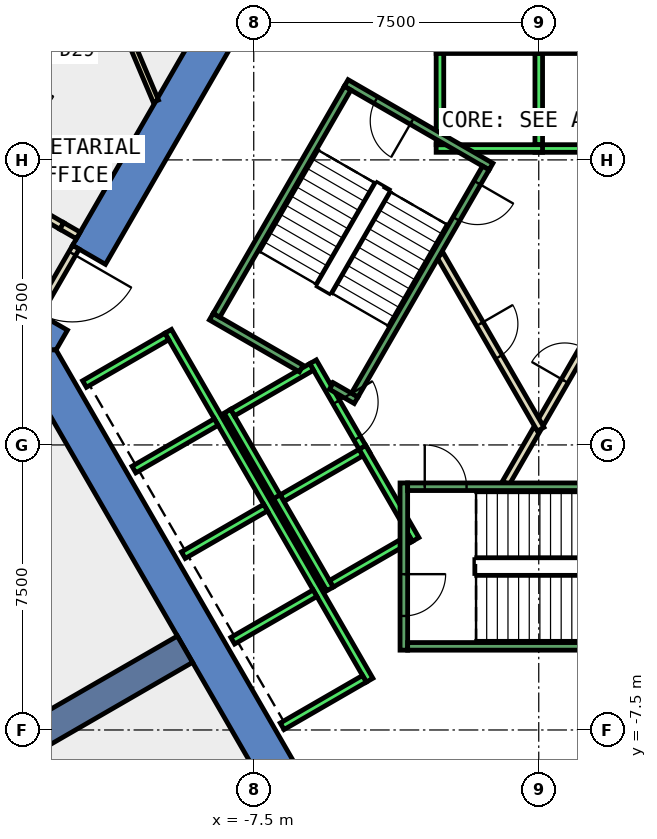
"""IFC4 building model, lengths in metres.
Left out: names, types, materials, properties, quantities, classifications, styles, units other than length and angle.
Written with IfcOpenShell. Run it as: python <this file> out.ifc"""

import sys

from ifc_helpers import new_model, si_unit, direction, frame, frame_2d, origin, place, context, subcontext, project, spatial, polyline, rectangle, outline, extrude, element, fill, save


model = new_model("IFC4")
c1 = context("Model", 3, precision=1e-05, world=origin(), true_north=direction((0.0, 1.0)))
c2 = subcontext(c1, "Body", "Model", "MODEL_VIEW")
j1 = project(units=[si_unit("LENGTHUNIT", "METRE"), si_unit("PLANEANGLEUNIT", "RADIAN")], contexts=[c1])
p1 = place(None, origin())
s1 = spatial("IfcSite", under=j1, at=p1, CompositionType="ELEMENT")
p2 = place(p1, origin())
s2 = spatial("IfcBuilding", under=s1, at=p2, CompositionType="ELEMENT")
p3 = place(p2, frame((0.0, 0.0, 180.2)))
s3 = spatial("IfcBuildingStorey", under=s2, at=p3, CompositionType="ELEMENT", Elevation=180.2)
p4 = place(p3, frame((0.0, 0.0, -0.4)))
e1 = element("IfcWall", 1, at=p4, inside=s3, PredefinedType="SHEAR", context=c2, shape_type="SweptSolid", body=[
    extrude(outline(polyline([(-12.267, 5.252), (-11.402, 4.752), (-6.351, 13.5), (-6.928, 14.5), (-12.267, 5.252)])), origin(), (0.0, 0.0, 1.0), 4.0),
])
p5 = place(p3, frame((0.0, 0.0, -0.4)))
e2 = element("IfcWall", 2, at=p5, inside=s3, PredefinedType="SHEAR", context=c2, shape_type="SweptSolid", body=[
    extrude(outline(polyline([(-12.402, 3.02), (-13.267, 3.52), (-13.856, 2.5), (-12.702, 2.5), (-12.402, 3.02)])), origin(), (0.0, 0.0, 1.0), 4.0),
])
p6 = place(p3, frame((0.0, 0.0, -0.4)))
e3 = element("IfcWall", 3, at=p6, inside=s3, PredefinedType="SHEAR", context=c2, shape_type="SweptSolid", body=[
    extrude(outline(polyline([(-13.856, 2.5), (-6.928, -9.5), (-6.351, -8.5), (-12.702, 2.5), (-13.856, 2.5)])), origin(), (0.0, 0.0, 1.0), 4.0),
])
p7 = place(p3, frame((-9.31, -5.375, -0.4), z_axis=(0.0, 0.0, 1.0), x_axis=(-0.866017533419, -0.500013631625, 0.0)))
e4 = element("IfcWall", 4, at=p7, inside=s3, PredefinedType="SHEAR", context=c2, shape_type="SweptSolid", body=[
    extrude(rectangle(XDim=9.0, YDim=0.8, at=frame_2d((4.5, 0.0))), origin(), (0.0, 0.0, 1.0), 4.0),
])
p8 = place(p3, frame((-12.67, 11.334, 0.0), z_axis=(0.0, 0.0, 1.0), x_axis=(-0.500035159864, -0.866005103276, 0.0)))
e5 = element("IfcWall", 5, at=p8, inside=s3, PredefinedType="PARTITIONING", context=c2, shape_type="SweptSolid", body=[
    extrude(rectangle(XDim=4.866, YDim=0.2, at=frame_2d((2.433, 0.0))), origin(), (0.0, 0.0, 1.0), 3.6),
])
p9 = place(p8, frame((1.933, 0.0, 0.0)))
e6 = element("IfcOpeningElement", 6, at=p9, cuts=e5, PredefinedType="OPENING", context=c2, shape_type="SweptSolid", body=[
    extrude(rectangle(XDim=1.0, YDim=2.1, at=frame_2d((0.5, 1.05))), frame((0.0, 0.11, 0.0), z_axis=(0.0, -1.0, 0.0), x_axis=(1.0, 0.0, 0.0)), (0.0, 0.0, 1.0), 0.22),
])
p10 = place(p3, frame((-14.966, 7.157, 0.0), z_axis=(0.0, 0.0, 1.0), x_axis=(0.86600487494, -0.500035555316, 0.0)))
e7 = element("IfcWall", 7, at=p10, inside=s3, PredefinedType="PARTITIONING", context=c2, shape_type="SweptSolid", body=[
    extrude(rectangle(XDim=2.79, YDim=0.2, at=frame_2d((1.395, 0.0))), origin(), (0.0, 0.0, 1.0), 3.6),
])
p11 = place(p3, frame((-10.076, 9.047, 0.0), z_axis=(0.0, 0.0, 1.0), x_axis=(-0.389223462263, 0.921143363665, 0.0)))
e8 = element("IfcWall", 8, at=p11, inside=s3, PredefinedType="PARTITIONING", context=c2, shape_type="SweptSolid", body=[
    extrude(rectangle(XDim=4.322, YDim=0.15, at=frame_2d((2.161, 0.0))), origin(), (0.0, 0.0, 1.0), 3.6),
])
p12 = place(p3, frame((-0.866, -1.0, 0.0), z_axis=(0.0, 0.0, 1.0), x_axis=(0.500033287521, 0.866006184372, 0.0)))
e9 = element("IfcWall", 9, at=p12, inside=s3, PredefinedType="PARTITIONING", context=c2, shape_type="SweptSolid", body=[
    extrude(rectangle(XDim=1.632, YDim=0.2, at=frame_2d((0.816, 0.0))), origin(), (0.0, 0.0, 1.0), 3.6),
])
p13 = place(p3, frame((0.05, 0.587, 0.0), z_axis=(0.0, 0.0, 1.0), x_axis=(0.500028932171, 0.866008699143, 0.0)))
e10 = element("IfcWall", 10, at=p13, inside=s3, PredefinedType="PARTITIONING", context=c2, shape_type="SweptSolid", body=[
    extrude(rectangle(XDim=3.632, YDim=0.2, at=frame_2d((1.816, 0.0))), origin(), (0.0, 0.0, 1.0), 3.6),
])
p14 = place(p13, frame((1.266, 0.0, 0.0)))
e11 = element("IfcOpeningElement", 11, at=p14, cuts=e10, PredefinedType="OPENING", context=c2, shape_type="SweptSolid", body=[
    extrude(rectangle(XDim=1.0, YDim=2.1, at=frame_2d((0.5, 1.05))), frame((0.0, 0.11, 0.0), z_axis=(0.0, -1.0, 0.0), x_axis=(1.0, 0.0, 0.0)), (0.0, 0.0, 1.0), 0.22),
])
p15 = place(p3, frame((-2.598, 5.0, 0.0), z_axis=(0.0, 0.0, 1.0), x_axis=(0.49995654735, -0.86605048973, 0.0)))
e12 = element("IfcWall", 12, at=p15, inside=s3, PredefinedType="PARTITIONING", context=c2, shape_type="SweptSolid", body=[
    extrude(rectangle(XDim=5.296, YDim=0.2, at=frame_2d((2.648, 0.0))), origin(), (0.0, 0.0, 1.0), 3.6),
])
p16 = place(p15, frame((2.098, 0.0, 0.0)))
e13 = element("IfcOpeningElement", 13, at=p16, cuts=e12, PredefinedType="OPENING", context=c2, shape_type="SweptSolid", body=[
    extrude(rectangle(XDim=1.0, YDim=2.1, at=frame_2d((0.5, 1.05))), frame((0.0, 0.11, 0.0), z_axis=(0.0, -1.0, 0.0), x_axis=(1.0, 0.0, 0.0)), (0.0, 0.0, 1.0), 0.22),
])
p17 = place(p3, frame((-12.18, 5.202, 0.0), z_axis=(0.0, 0.0, 1.0), x_axis=(-0.50002537861, -0.866010750942, 0.0)))
e14 = element("IfcWall", 14, at=p17, inside=s3, PredefinedType="PARTITIONING", context=c2, shape_type="SweptSolid", body=[
    extrude(rectangle(XDim=2.0, YDim=0.2, at=frame_2d((1.0, 0.0))), origin(), (0.0, 0.0, 1.0), 2.4),
])
p18 = place(p17, frame((0.19, 0.0, 0.0)))
e15 = element("IfcOpeningElement", 15, at=p18, cuts=e14, PredefinedType="OPENING", context=c2, shape_type="SweptSolid", body=[
    extrude(rectangle(XDim=1.8, YDim=2.1, at=frame_2d((0.9, 1.05))), frame((0.0, 0.11, 0.0), z_axis=(0.0, -1.0, 0.0), x_axis=(1.0, 0.0, 0.0)), (0.0, 0.0, 1.0), 0.22),
])
p19 = place(p3, frame((-12.55, 5.762, 0.0), z_axis=(0.0, 0.0, 1.0), x_axis=(0.866071776036, -0.499919672301, 0.0)))
e16 = element("IfcWall", 16, at=p19, inside=s3, PredefinedType="PARTITIONING", context=c2, shape_type="SweptSolid", body=[
    extrude(rectangle(XDim=0.5, YDim=0.2, at=frame_2d((0.25, 0.0))), origin(), (0.0, 0.0, 1.0), 2.4),
])
p20 = place(p3, frame((-5.94, 2.188, 0.0), z_axis=(0.0, 0.0, 1.0), x_axis=(0.49994636267, -0.866056369097, 0.0)))
e17 = element("IfcWall", 17, at=p20, inside=s3, PredefinedType="STANDARD", context=c2, shape_type="SweptSolid", body=[
    extrude(rectangle(XDim=2.8, YDim=0.2, at=frame_2d((1.4, 0.0))), origin(), (0.0, 0.0, 1.0), 3.6),
])
p21 = place(p20, frame((1.225, 0.0, 0.0)))
e18 = element("IfcOpeningElement", 18, at=p21, cuts=e17, PredefinedType="OPENING", context=c2, shape_type="SweptSolid", body=[
    extrude(rectangle(XDim=1.1, YDim=2.1, at=frame_2d((0.55, 1.05))), frame((0.0, 0.11, 0.0), z_axis=(0.0, -1.0, 0.0), x_axis=(1.0, 0.0, 0.0)), (0.0, 0.0, 1.0), 0.22),
])
p22 = place(p3, frame((-8.192, 0.888, 0.0), z_axis=(0.0, 0.0, 1.0), x_axis=(0.49994636267, -0.866056369097, 0.0)))
e19 = element("IfcWall", 19, at=p22, inside=s3, PredefinedType="STANDARD", context=c2, shape_type="SweptSolid", body=[
    extrude(rectangle(XDim=2.8, YDim=0.2, at=frame_2d((1.4, 0.0))), origin(), (0.0, 0.0, 1.0), 3.6),
])
for number, where, z_axis, x_axis in (
    (20, (-5.977, 2.052, 0.0), (0.0, 0.0, 1.0), (-0.866, -0.5, 0.0)),
    (21, (-4.677, -0.2, 0.0), (0.0, 0.0, 1.0), (-0.866, -0.5, 0.0)),
):
    element("IfcWall", number, at=place(p3, frame(where, z_axis=z_axis, x_axis=x_axis)), inside=s3, PredefinedType="STANDARD", context=c2, shape_type="SweptSolid", body=[
        extrude(rectangle(XDim=2.399, YDim=0.2, at=frame_2d((1.2, 0.0))), origin(), (0.0, 0.0, 1.0), 3.6),
    ])
p23 = place(p3, frame((-9.751, 2.99, 0.0), z_axis=(0.0, 0.0, 1.0), x_axis=(0.50000090737, -0.866024879913, 0.0)))
e22 = element("IfcWall", 22, at=p23, inside=s3, PredefinedType="STANDARD", context=c2, shape_type="SweptSolid", body=[
    extrude(rectangle(XDim=10.6, YDim=0.2, at=frame_2d((5.3, 0.0))), origin(), (0.0, 0.0, 1.0), 3.6),
])
p24 = place(p3, frame((-9.788, 2.853, 0.0), z_axis=(0.0, 0.0, 1.0), x_axis=(-0.865998541277, -0.500046524342, 0.0)))
e23 = element("IfcWall", 23, at=p24, inside=s3, PredefinedType="STANDARD", context=c2, shape_type="SweptSolid", body=[
    extrude(rectangle(XDim=2.5, YDim=0.2, at=frame_2d((1.25, 0.0))), origin(), (0.0, 0.0, 1.0), 3.6),
])
for number, where, z_axis, x_axis in (
    (24, (-8.488, 0.602, 0.0), (0.0, 0.0, 1.0), (-0.866, -0.5, 0.0)),
    (25, (-7.188, -1.65, 0.0), (0.0, 0.0, 1.0), (-0.866, -0.5, 0.0)),
    (26, (-5.888, -3.902, 0.0), (0.0, 0.0, 1.0), (-0.866, -0.5, 0.0)),
    (27, (-4.588, -6.153, 0.0), (0.0, 0.0, 1.0), (-0.866, -0.5, 0.0)),
):
    element("IfcWall", number, at=place(p3, frame(where, z_axis=z_axis, x_axis=x_axis)), inside=s3, PredefinedType="STANDARD", context=c2, shape_type="SweptSolid", body=[
        extrude(rectangle(XDim=2.5, YDim=0.2, at=frame_2d((1.25, 0.0))), origin(), (0.0, 0.0, 1.0), 3.6),
    ])
for number, where, z_axis, x_axis in (
    (28, (2.7, 7.8, 0.0), (0.0, 0.0, 1.0), (-1.0, 0.0, 0.0)),
    (29, (2.7, 10.4, 0.0), (0.0, 0.0, 1.0), (-1.0, 0.0, 0.0)),
):
    element("IfcWall", number, at=place(p3, frame(where, z_axis=z_axis, x_axis=x_axis)), inside=s3, PredefinedType="STANDARD", context=c2, shape_type="SweptSolid", body=[
        extrude(rectangle(XDim=2.8, YDim=0.2, at=frame_2d((1.4, 0.0))), origin(), (0.0, 0.0, 1.0), 2.3),
    ])
p25 = place(p3, frame((0.0, 7.9, 0.0), z_axis=(0.0, 0.0, 1.0), x_axis=(0.0, 1.0, 0.0)))
e30 = element("IfcWall", 30, at=p25, inside=s3, PredefinedType="STANDARD", context=c2, shape_type="SweptSolid", body=[
    extrude(rectangle(XDim=2.4, YDim=0.2, at=frame_2d((1.2, 0.0))), origin(), (0.0, 0.0, 1.0), 2.3),
])
for number, where, z_axis, x_axis in (
    (31, (0.1, 7.8, 0.0), (0.0, 0.0, 1.0), (-1.0, 0.0, 0.0)),
    (32, (0.1, 10.4, 0.0), (0.0, 0.0, 1.0), (-1.0, 0.0, 0.0)),
):
    element("IfcWall", number, at=place(p3, frame(where, z_axis=z_axis, x_axis=x_axis)), inside=s3, PredefinedType="STANDARD", context=c2, shape_type="SweptSolid", body=[
        extrude(rectangle(XDim=2.8, YDim=0.2, at=frame_2d((1.4, 0.0))), origin(), (0.0, 0.0, 1.0), 2.3),
    ])
p26 = place(p3, frame((-2.6, 7.9, 0.0), z_axis=(0.0, 0.0, 1.0), x_axis=(0.0, 1.0, 0.0)))
e33 = element("IfcWall", 33, at=p26, inside=s3, PredefinedType="STANDARD", context=c2, shape_type="SweptSolid", body=[
    extrude(rectangle(XDim=2.4, YDim=0.2, at=frame_2d((1.2, 0.0))), origin(), (0.0, 0.0, 1.0), 2.3),
])
p27 = place(p3, frame((-4.64, -0.063, 0.0), z_axis=(0.0, 0.0, 1.0), x_axis=(0.49994636267, -0.866056369097, 0.0)))
e34 = element("IfcWall", 34, at=p27, inside=s3, PredefinedType="STANDARD", context=c2, shape_type="SweptSolid", body=[
    extrude(rectangle(XDim=2.8, YDim=0.2, at=frame_2d((1.4, 0.0))), origin(), (0.0, 0.0, 1.0), 2.3),
])
p28 = place(p3, frame((-6.892, -1.363, 0.0), z_axis=(0.0, 0.0, 1.0), x_axis=(0.500011755427, -0.866018616679, 0.0)))
e35 = element("IfcWall", 35, at=p28, inside=s3, PredefinedType="STANDARD", context=c2, shape_type="SweptSolid", body=[
    extrude(rectangle(XDim=2.8, YDim=0.2, at=frame_2d((1.4, 0.0))), origin(), (0.0, 0.0, 1.0), 2.3),
])
p29 = place(p3, frame((-3.377, -2.452, 0.0), z_axis=(0.0, 0.0, 1.0), x_axis=(-0.865955154139, -0.50012165622, 0.0)))
e36 = element("IfcWall", 36, at=p29, inside=s3, PredefinedType="STANDARD", context=c2, shape_type="SweptSolid", body=[
    extrude(rectangle(XDim=2.4, YDim=0.2, at=frame_2d((1.2, 0.0))), origin(), (0.0, 0.0, 1.0), 2.3),
])
p30 = place(p3, frame((-3.55, -1.0, 0.0), z_axis=(0.0, 0.0, 1.0), x_axis=(0.0, -1.0, 0.0)))
e37 = element("IfcWall", 37, at=p30, inside=s3, PredefinedType="STANDARD", context=c2, shape_type="SweptSolid", body=[
    extrude(rectangle(XDim=4.4, YDim=0.2, at=frame_2d((2.2, 0.0))), origin(), (0.0, 0.0, 1.0), 3.6),
])
p31 = place(p30, frame((2.4, 0.0, 0.0)))
e38 = element("IfcOpeningElement", 38, at=p31, cuts=e37, PredefinedType="OPENING", context=c2, shape_type="SweptSolid", body=[
    extrude(rectangle(XDim=1.1, YDim=2.2, at=frame_2d((0.55, 1.1))), frame((0.0, 0.11, 0.0), z_axis=(0.0, -1.0, 0.0), x_axis=(1.0, 0.0, 0.0)), (0.0, 0.0, 1.0), 0.22),
])
p32 = place(p3, frame((-3.45, -1.1, 0.0), z_axis=(0.0, 0.0, 1.0), x_axis=(1.0, 0.0, 0.0)))
e39 = element("IfcWall", 39, at=p32, inside=s3, PredefinedType="STANDARD", context=c2, shape_type="SweptSolid", body=[
    extrude(rectangle(XDim=6.9, YDim=0.2, at=frame_2d((3.45, 0.0))), origin(), (0.0, 0.0, 1.0), 3.6),
])
p33 = place(p32, frame((0.45, 0.0, 0.0)))
e40 = element("IfcOpeningElement", 40, at=p33, cuts=e39, PredefinedType="OPENING", context=c2, shape_type="SweptSolid", body=[
    extrude(rectangle(XDim=1.1, YDim=2.2, at=frame_2d((0.55, 1.1))), frame((0.0, 0.11, 0.0), z_axis=(0.0, -1.0, 0.0), x_axis=(1.0, 0.0, 0.0)), (0.0, 0.0, 1.0), 0.22),
])
p34 = place(p3, frame((-3.45, -5.3, 0.0), z_axis=(0.0, 0.0, 1.0), x_axis=(1.0, 0.0, 0.0)))
e41 = element("IfcWall", 41, at=p34, inside=s3, PredefinedType="STANDARD", context=c2, shape_type="SweptSolid", body=[
    extrude(rectangle(XDim=6.9, YDim=0.2, at=frame_2d((3.45, 0.0))), origin(), (0.0, 0.0, 1.0), 3.6),
])
p35 = place(p3, frame((-1.256, 7.324, 0.0), z_axis=(0.0, 0.0, 1.0), x_axis=(-0.866046073146, 0.499964197906, 0.0)))
e42 = element("IfcWall", 42, at=p35, inside=s3, PredefinedType="STANDARD", context=c2, shape_type="SweptSolid", body=[
    extrude(rectangle(XDim=4.4, YDim=0.2, at=frame_2d((2.2, 0.0))), origin(), (0.0, 0.0, 1.0), 3.6),
])
p36 = place(p35, frame((2.4, 0.0, 0.0)))
e43 = element("IfcOpeningElement", 43, at=p36, cuts=e42, PredefinedType="OPENING", context=c2, shape_type="SweptSolid", body=[
    extrude(rectangle(XDim=1.1, YDim=2.2, at=frame_2d((0.55, 1.1))), frame((0.0, 0.11, 0.0), z_axis=(0.0, -1.0, 0.0), x_axis=(1.0, 0.0, 0.0)), (0.0, 0.0, 1.0), 0.22),
])
p37 = place(p3, frame((-6.25, 2.01, 0.0), z_axis=(0.0, 0.0, 1.0), x_axis=(-0.86611865017, 0.499838457731, 0.0)))
e44 = element("IfcWall", 44, at=p37, inside=s3, PredefinedType="STANDARD", context=c2, shape_type="SweptSolid", body=[
    extrude(rectangle(XDim=2.733, YDim=0.2, at=frame_2d((1.366, 0.0))), origin(), (0.0, 0.0, 1.0), 3.6),
])
p38 = place(p3, frame((-4.806, 1.176, 0.0), z_axis=(0.0, 0.0, 1.0), x_axis=(-0.866558586415, 0.499075361355, 0.0)))
e45 = element("IfcWall", 45, at=p38, inside=s3, PredefinedType="STANDARD", context=c2, shape_type="SweptSolid", body=[
    extrude(rectangle(XDim=0.751, YDim=0.2, at=frame_2d((0.376, 0.0))), origin(), (0.0, 0.0, 1.0), 3.6),
])
p39 = place(p3, frame((-1.393, 7.288, 0.0), z_axis=(0.0, 0.0, 1.0), x_axis=(-0.499963383562, -0.866046543262, 0.0)))
e46 = element("IfcWall", 46, at=p39, inside=s3, PredefinedType="STANDARD", context=c2, shape_type="SweptSolid", body=[
    extrude(rectangle(XDim=6.9, YDim=0.2, at=frame_2d((3.45, 0.0))), origin(), (0.0, 0.0, 1.0), 3.6),
])
p40 = place(p39, frame((0.45, 0.0, 0.0)))
e47 = element("IfcOpeningElement", 47, at=p40, cuts=e46, PredefinedType="OPENING", context=c2, shape_type="SweptSolid", body=[
    extrude(rectangle(XDim=1.1, YDim=2.2, at=frame_2d((0.55, 1.1))), frame((0.0, 0.11, 0.0), z_axis=(0.0, -1.0, 0.0), x_axis=(1.0, 0.0, 0.0)), (0.0, 0.0, 1.0), 0.22),
])
p41 = place(p3, frame((-5.03, 9.388, 0.0), z_axis=(0.0, 0.0, 1.0), x_axis=(-0.499978703459, -0.866037698999, 0.0)))
e48 = element("IfcWall", 48, at=p41, inside=s3, PredefinedType="STANDARD", context=c2, shape_type="SweptSolid", body=[
    extrude(rectangle(XDim=6.9, YDim=0.2, at=frame_2d((3.45, 0.0))), origin(), (0.0, 0.0, 1.0), 3.6),
])
p42 = place(p14, origin())
e49 = element("IfcDoor", 49, at=p42, inside=s3, OperationType="SINGLE_SWING_RIGHT", PredefinedType="DOOR", context=c2, shape_type="SweptSolid", body=[
    extrude(rectangle(XDim=1.0, YDim=2.1, at=frame_2d((0.5, 1.05))), frame((0.0, 0.025, 0.0), z_axis=(0.0, -1.0, 0.0), x_axis=(1.0, 0.0, 0.0)), (0.0, 0.0, 1.0), 0.05),
])
fill(e11, e49)
p43 = place(p16, origin())
e50 = element("IfcDoor", 50, at=p43, inside=s3, OperationType="SINGLE_SWING_RIGHT", PredefinedType="DOOR", context=c2, shape_type="SweptSolid", body=[
    extrude(rectangle(XDim=1.0, YDim=2.1, at=frame_2d((0.5, 1.05))), frame((0.0, 0.025, 0.0), z_axis=(0.0, -1.0, 0.0), x_axis=(1.0, 0.0, 0.0)), (0.0, 0.0, 1.0), 0.05),
])
fill(e13, e50)
p44 = place(p18, origin())
e51 = element("IfcDoor", 51, at=p44, inside=s3, OperationType="DOUBLE_DOOR_SINGLE_SWING", PredefinedType="DOOR", context=c2, shape_type="SweptSolid", body=[
    extrude(rectangle(XDim=1.8, YDim=2.1, at=frame_2d((0.9, 1.05))), frame((0.0, 0.025, 0.0), z_axis=(0.0, -1.0, 0.0), x_axis=(1.0, 0.0, 0.0)), (0.0, 0.0, 1.0), 0.05),
])
fill(e15, e51)
p45 = place(p21, origin())
e52 = element("IfcDoor", 52, at=p45, inside=s3, OperationType="SLIDING_TO_LEFT", PredefinedType="DOOR", context=c2, shape_type="SweptSolid", body=[
    extrude(rectangle(XDim=1.1, YDim=2.1, at=frame_2d((0.55, 1.05))), frame((0.0, 0.025, 0.0), z_axis=(0.0, -1.0, 0.0), x_axis=(1.0, 0.0, 0.0)), (0.0, 0.0, 1.0), 0.05),
])
fill(e18, e52)
p46 = place(p33, origin())
e53 = element("IfcDoor", 53, at=p46, inside=s3, OperationType="SINGLE_SWING_LEFT", PredefinedType="DOOR", context=c2, shape_type="SweptSolid", body=[
    extrude(rectangle(XDim=1.1, YDim=2.2, at=frame_2d((0.55, 1.1))), frame((0.0, 0.025, 0.0), z_axis=(0.0, -1.0, 0.0), x_axis=(1.0, 0.0, 0.0)), (0.0, 0.0, 1.0), 0.05),
])
fill(e40, e53)
p47 = place(p31, origin())
e54 = element("IfcDoor", 54, at=p47, inside=s3, OperationType="SINGLE_SWING_LEFT", PredefinedType="DOOR", context=c2, shape_type="SweptSolid", body=[
    extrude(rectangle(XDim=1.1, YDim=2.2, at=frame_2d((0.55, 1.1))), frame((0.0, 0.025, 0.0), z_axis=(0.0, -1.0, 0.0), x_axis=(1.0, 0.0, 0.0)), (0.0, 0.0, 1.0), 0.05),
])
fill(e38, e54)
p48 = place(p40, origin())
e55 = element("IfcDoor", 55, at=p48, inside=s3, OperationType="SINGLE_SWING_LEFT", PredefinedType="DOOR", context=c2, shape_type="SweptSolid", body=[
    extrude(rectangle(XDim=1.1, YDim=2.2, at=frame_2d((0.55, 1.1))), frame((0.0, 0.025, 0.0), z_axis=(0.0, -1.0, 0.0), x_axis=(1.0, 0.0, 0.0)), (0.0, 0.0, 1.0), 0.05),
])
fill(e47, e55)
p49 = place(p36, origin())
e56 = element("IfcDoor", 56, at=p49, inside=s3, OperationType="SINGLE_SWING_LEFT", PredefinedType="DOOR", context=c2, shape_type="SweptSolid", body=[
    extrude(rectangle(XDim=1.1, YDim=2.2, at=frame_2d((0.55, 1.1))), frame((0.0, 0.025, 0.0), z_axis=(0.0, -1.0, 0.0), x_axis=(1.0, 0.0, 0.0)), (0.0, 0.0, 1.0), 0.05),
])
fill(e43, e56)
save(model, sys.argv[1])
